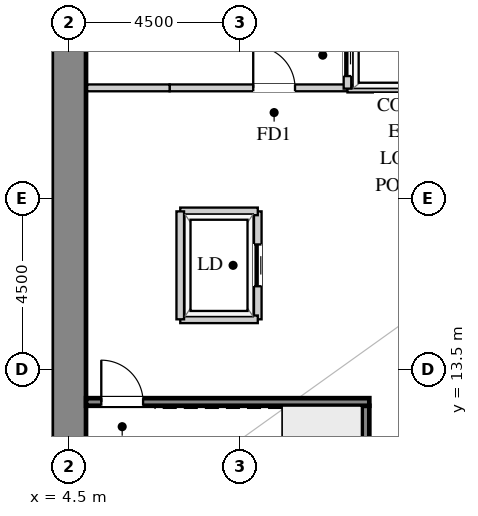
"""IFC4 building model, lengths in metres.
Left out: names, types, materials, properties, quantities, classifications, styles, units other than length and angle.
Written with IfcOpenShell. Run it as: python <this file> out.ifc"""

import sys

from ifc_helpers import new_model, si_unit, direction, frame, frame_2d, origin, place, context, subcontext, project, spatial, rectangle, extrude, source, transform, mapped, element, fill, save


model = new_model("IFC4")
c1 = context("Model", 3, precision=1e-05, world=origin(), true_north=direction((0.0, 1.0)))
c2 = subcontext(c1, "Body", "Model", "MODEL_VIEW")
j1 = project(units=[si_unit("LENGTHUNIT", "METRE"), si_unit("PLANEANGLEUNIT", "RADIAN")], contexts=[c1])
p1 = place(None, origin())
s1 = spatial("IfcSite", under=j1, at=p1, CompositionType="ELEMENT")
p2 = place(p1, origin())
s2 = spatial("IfcBuilding", under=s1, at=p2, CompositionType="ELEMENT")
p3 = place(p2, frame((0.0, 0.0, -9.0)))
s3 = spatial("IfcBuildingStorey", under=s2, at=p3, CompositionType="ELEMENT", Elevation=-9.0)
m1 = source(origin(), c2, "Body", "SweptSolid", [
    extrude(rectangle(XDim=20.1, YDim=0.9, at=frame_2d((10.05, 0.0))), origin(), (0.0, 0.0, 1.0), 4.2),
])
p4 = place(p3, frame((4.5, 8.95, 0.0), z_axis=(0.0, 0.0, 1.0), x_axis=(0.0, 1.0, 0.0)))
e1 = element("IfcWall", 1, at=p4, inside=s3, PredefinedType="SHEAR", context=c2, shape_type="MappedRepresentation", body=[
    mapped(m1, transform((0.0, 0.0, 0.0), x_axis=(1.0, 0.0, 0.0), y_axis=(0.0, 1.0, 0.0), z_axis=(0.0, 0.0, 1.0))),
])
p5 = place(p3, frame((7.15, 20.92, 0.0), z_axis=(0.0, 0.0, 1.0), x_axis=(1.0, 0.0, 0.0)))
e2 = element("IfcWall", 2, at=p5, inside=s3, PredefinedType="PARTITIONING", context=c2, shape_type="SweptSolid", body=[
    extrude(rectangle(XDim=4.68, YDim=0.18, at=frame_2d((2.34, 0.0))), origin(), (0.0, 0.0, 1.0), 4.185),
])
p6 = place(p5, frame((2.2, 0.0, 0.0)))
e3 = element("IfcOpeningElement", 3, at=p6, cuts=e2, PredefinedType="OPENING", context=c2, shape_type="SweptSolid", body=[
    extrude(rectangle(XDim=1.1, YDim=2.15, at=frame_2d((0.55, 1.075))), frame((0.0, 0.1, 0.0), z_axis=(0.0, -1.0, 0.0), x_axis=(1.0, 0.0, 0.0)), (0.0, 0.0, 1.0), 0.2),
])
m2 = source(origin(), c2, "Body", "SweptSolid", [
    extrude(rectangle(XDim=2.17, YDim=0.18, at=frame_2d((1.085, 0.0))), origin(), (0.0, 0.0, 1.0), 4.185),
])
p7 = place(p3, frame((4.98, 20.92, 0.0), z_axis=(0.0, 0.0, 1.0), x_axis=(1.0, 0.0, 0.0)))
e4 = element("IfcWall", 4, at=p7, inside=s3, PredefinedType="PARTITIONING", context=c2, shape_type="MappedRepresentation", body=[
    mapped(m2, transform((0.0, 0.0, 0.0), x_axis=(1.0, 0.0, 0.0), y_axis=(0.0, 1.0, 0.0), z_axis=(0.0, 0.0, 1.0))),
])
m3 = source(origin(), c2, "Body", "SweptSolid", [
    extrude(rectangle(XDim=2.19, YDim=0.2, at=frame_2d((1.095, 0.0))), origin(), (0.0, 0.0, 1.0), 4.185),
])
p8 = place(p3, frame((11.83, 20.9, 0.0), z_axis=(0.0, 0.0, 1.0), x_axis=(1.0, 0.0, 0.0)))
e5 = element("IfcWall", 5, at=p8, inside=s3, PredefinedType="PARTITIONING", context=c2, shape_type="MappedRepresentation", body=[
    mapped(m3, transform((0.0, 0.0, 0.0), x_axis=(1.0, 0.0, 0.0), y_axis=(0.0, 1.0, 0.0), z_axis=(0.0, 0.0, 1.0))),
])
p9 = place(p3, frame((11.83, 20.9, 0.0), z_axis=(0.0, 0.0, 1.0), x_axis=(0.0, 1.0, 0.0)))
e6 = element("IfcWall", 6, at=p9, inside=s3, PredefinedType="PARTITIONING", context=c2, shape_type="SweptSolid", body=[
    extrude(rectangle(XDim=1.76, YDim=0.2, at=frame_2d((0.88, 0.0))), origin(), (0.0, 0.0, 1.0), 4.185),
])
p10 = place(p9, frame((0.33, 0.0, 0.0)))
e7 = element("IfcOpeningElement", 7, at=p10, cuts=e6, PredefinedType="OPENING", context=c2, shape_type="SweptSolid", body=[
    extrude(rectangle(XDim=1.1, YDim=2.2, at=frame_2d((0.55, 1.1))), frame((0.0, 0.11, 0.0), z_axis=(0.0, -1.0, 0.0), x_axis=(1.0, 0.0, 0.0)), (0.0, 0.0, 1.0), 0.22),
])
p11 = place(p3, frame((9.47, 14.83, 0.0), z_axis=(0.0, 0.0, 1.0), x_axis=(0.0, 1.0, 0.0)))
e8 = element("IfcWall", 8, at=p11, inside=s3, PredefinedType="PARTITIONING", context=c2, shape_type="SweptSolid", body=[
    extrude(rectangle(XDim=2.84, YDim=0.2, at=frame_2d((1.42, 0.0))), origin(), (0.0, 0.0, 1.0), 4.185),
])
p12 = place(p11, frame((0.87, 0.0, 0.0)))
e9 = element("IfcOpeningElement", 9, at=p12, cuts=e8, PredefinedType="OPENING", context=c2, shape_type="SweptSolid", body=[
    extrude(rectangle(XDim=1.1, YDim=2.2, at=frame_2d((0.55, 1.1))), frame((0.0, 0.11, 0.0), z_axis=(0.0, -1.0, 0.0), x_axis=(1.0, 0.0, 0.0)), (0.0, 0.0, 1.0), 0.22),
])
m4 = source(origin(), c2, "Body", "SweptSolid", [
    extrude(rectangle(XDim=2.04, YDim=0.2, at=frame_2d((1.02, 0.0))), origin(), (0.0, 0.0, 1.0), 4.185),
])
for number, where, z_axis, x_axis in (
    (10, (7.43, 17.67, 0.0), (0.0, 0.0, 1.0), (1.0, 0.0, 0.0)),
    (11, (7.43, 14.83, 0.0), (0.0, 0.0, 1.0), (1.0, 0.0, 0.0)),
):
    element("IfcWall", number, at=place(p3, frame(where, z_axis=z_axis, x_axis=x_axis)), inside=s3, PredefinedType="PARTITIONING", context=c2, shape_type="MappedRepresentation", body=[
        mapped(m4, transform((0.0, 0.0, 0.0), x_axis=(1.0, 0.0, 0.0), y_axis=(0.0, 1.0, 0.0), z_axis=(0.0, 0.0, 1.0))),
    ])
m5 = source(origin(), c2, "Body", "SweptSolid", [
    extrude(rectangle(XDim=2.84, YDim=0.2, at=frame_2d((1.42, 0.0))), origin(), (0.0, 0.0, 1.0), 4.185),
])
p13 = place(p3, frame((7.43, 14.83, 0.0), z_axis=(0.0, 0.0, 1.0), x_axis=(0.0, 1.0, 0.0)))
e12 = element("IfcWall", 12, at=p13, inside=s3, PredefinedType="PARTITIONING", context=c2, shape_type="MappedRepresentation", body=[
    mapped(m5, transform((0.0, 0.0, 0.0), x_axis=(1.0, 0.0, 0.0), y_axis=(0.0, 1.0, 0.0), z_axis=(0.0, 0.0, 1.0))),
])
m6 = source(origin(), c2, "Body", "SweptSolid", [
    extrude(rectangle(XDim=3.603, YDim=0.2, at=frame_2d((1.802, 0.0))), origin(), (0.0, 0.0, 1.0), 4.2),
])
p14 = place(p3, frame((12.305, 8.952, 0.0), z_axis=(0.0, 0.0, 1.0), x_axis=(0.0, 1.0, 0.0)))
e13 = element("IfcWall", 13, at=p14, inside=s3, PredefinedType="SHEAR", context=c2, shape_type="MappedRepresentation", body=[
    mapped(m6, transform((0.0, 0.0, 0.0), x_axis=(1.0, 0.0, 0.0), y_axis=(0.0, 1.0, 0.0), z_axis=(0.0, 0.0, 1.0))),
])
p15 = place(p3, frame((4.952, 12.655, 0.0), z_axis=(0.0, 0.0, 1.0), x_axis=(1.0, 0.0, 0.0)))
e14 = element("IfcWall", 14, at=p15, inside=s3, PredefinedType="SHEAR", context=c2, shape_type="SweptSolid", body=[
    extrude(rectangle(XDim=7.453, YDim=0.2, at=frame_2d((3.727, 0.0))), origin(), (0.0, 0.0, 1.0), 4.2),
])
p16 = place(p15, frame((0.4, 0.0, 0.0)))
e15 = element("IfcOpeningElement", 15, at=p16, cuts=e14, PredefinedType="OPENING", context=c2, shape_type="SweptSolid", body=[
    extrude(rectangle(XDim=1.1, YDim=2.15, at=frame_2d((0.55, 1.075))), frame((0.0, 0.11, 0.0), z_axis=(0.0, -1.0, 0.0), x_axis=(1.0, 0.0, 0.0)), (0.0, 0.0, 1.0), 0.22),
])
m7 = source(origin(), c2, "Body", "SweptSolid", [
    extrude(rectangle(XDim=1.1, YDim=2.15, at=frame_2d((0.55, 1.075))), frame((0.0, 0.025, 0.0), z_axis=(0.0, -1.0, 0.0), x_axis=(1.0, 0.0, 0.0)), (0.0, 0.0, 1.0), 0.05),
])
p17 = place(p6, origin())
e16 = element("IfcDoor", 16, at=p17, inside=s3, OperationType="SINGLE_SWING_LEFT", PredefinedType="DOOR", context=c2, shape_type="MappedRepresentation", body=[
    mapped(m7, transform((0.0, 0.0, 0.0), x_axis=(1.0, 0.0, 0.0), y_axis=(0.0, 1.0, 0.0), z_axis=(0.0, 0.0, 1.0))),
])
fill(e3, e16)
m8 = source(origin(), c2, "Body", "SweptSolid", [
    extrude(rectangle(XDim=1.1, YDim=2.2, at=frame_2d((0.55, 1.1))), frame((0.0, 0.025, 0.0), z_axis=(0.0, -1.0, 0.0), x_axis=(1.0, 0.0, 0.0)), (0.0, 0.0, 1.0), 0.05),
])
p18 = place(p10, origin())
e17 = element("IfcDoor", 17, at=p18, inside=s3, OperationType="SLIDING_TO_LEFT", PredefinedType="DOOR", context=c2, shape_type="MappedRepresentation", body=[
    mapped(m8, transform((0.0, 0.0, 0.0), x_axis=(1.0, 0.0, 0.0), y_axis=(0.0, 1.0, 0.0), z_axis=(0.0, 0.0, 1.0))),
])
fill(e7, e17)
p19 = place(p12, origin())
e18 = element("IfcDoor", 18, at=p19, inside=s3, OperationType="SLIDING_TO_LEFT", PredefinedType="DOOR", context=c2, shape_type="MappedRepresentation", body=[
    mapped(m8, transform((0.0, 0.0, 0.0), x_axis=(1.0, 0.0, 0.0), y_axis=(0.0, 1.0, 0.0), z_axis=(0.0, 0.0, 1.0))),
])
fill(e9, e18)
m9 = source(origin(), c2, "Body", "SweptSolid", [
    extrude(rectangle(XDim=1.1, YDim=2.15, at=frame_2d((0.55, 1.075))), frame((0.0, 0.025, 0.0), z_axis=(0.0, -1.0, 0.0), x_axis=(1.0, 0.0, 0.0)), (0.0, 0.0, 1.0), 0.05),
])
p20 = place(p16, origin())
e19 = element("IfcDoor", 19, at=p20, inside=s3, OperationType="SINGLE_SWING_LEFT", PredefinedType="DOOR", context=c2, shape_type="MappedRepresentation", body=[
    mapped(m9, transform((0.0, 0.0, 0.0), x_axis=(1.0, 0.0, 0.0), y_axis=(0.0, 1.0, 0.0), z_axis=(0.0, 0.0, 1.0))),
])
fill(e15, e19)
save(model, sys.argv[1])
